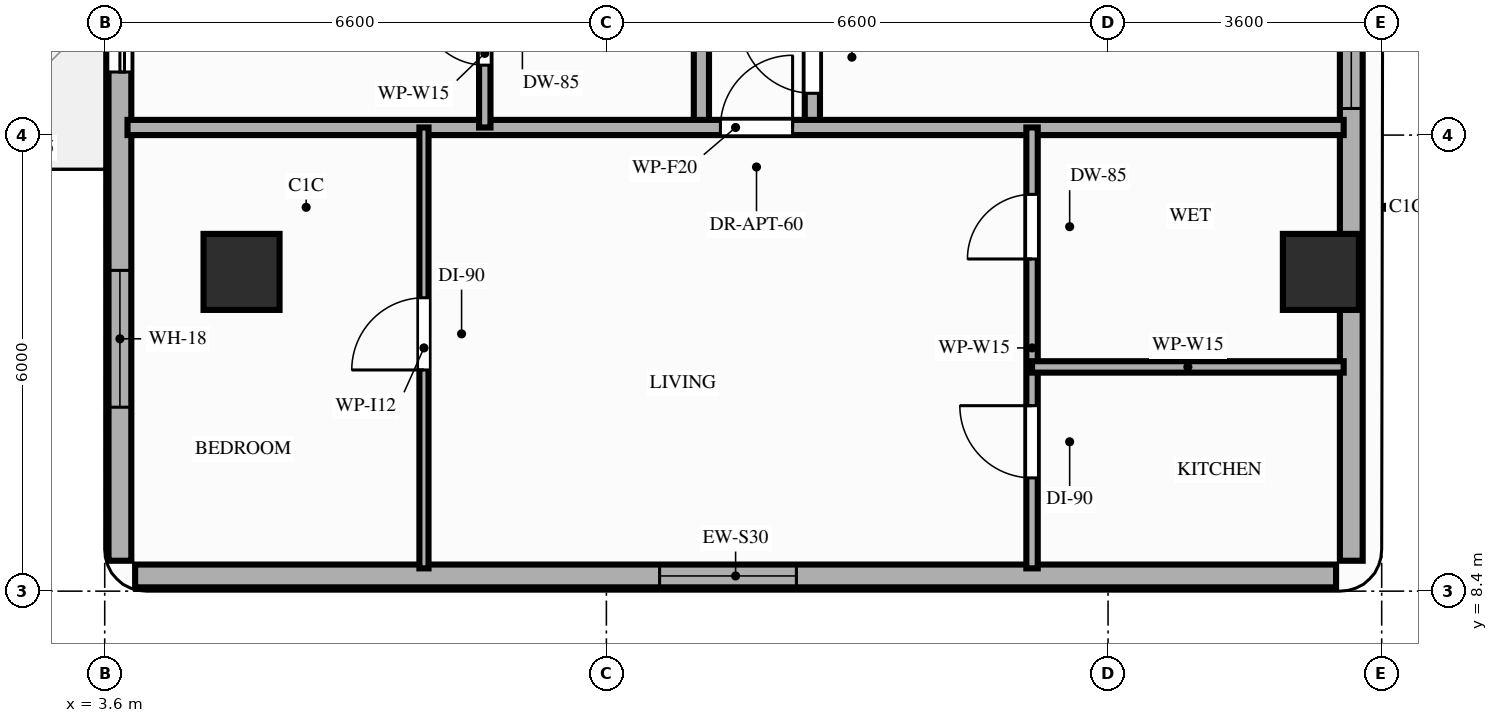
"""IFC4 building model, lengths in metres.
Left out: names, types, materials, properties, quantities, classifications, styles, units other than length and angle.
Written with IfcOpenShell. Run it as: python <this file> out.ifc"""

import sys

from ifc_helpers import new_model, si_unit, direction, frame, frame_2d, origin, origin_2d, place, context, subcontext, project, spatial, rectangle, extrude, element, fill, save


model = new_model("IFC4")
c1 = context("Model", 3, precision=1e-05, world=origin(), true_north=direction((0.0, 1.0)))
c2 = subcontext(c1, "Body", "Model", "MODEL_VIEW")
j1 = project(units=[si_unit("LENGTHUNIT", "METRE"), si_unit("PLANEANGLEUNIT", "RADIAN")], contexts=[c1])
p1 = place(None, origin())
s1 = spatial("IfcSite", under=j1, at=p1, CompositionType="ELEMENT")
p2 = place(p1, origin())
s2 = spatial("IfcBuilding", under=s1, at=p2, CompositionType="ELEMENT")
p3 = place(p2, frame((0.0, 0.0, 107.4)))
s3 = spatial("IfcBuildingStorey", under=s2, at=p3, CompositionType="ELEMENT", Elevation=107.4)
for number, where, z_axis, x_axis in (
    (1, (5.4, 12.6, 0.0), (0.0, 0.0, 1.0), (1.0, 0.0, 0.0)),
    (2, (19.6, 12.6, 0.0), (0.0, 0.0, 1.0), (1.0, 0.0, 0.0)),
):
    element("IfcColumn", number, at=place(p3, frame(where, z_axis=z_axis, x_axis=x_axis)), inside=s3, PredefinedType="COLUMN", context=c2, shape_type="SweptSolid", body=[
        extrude(rectangle(XDim=1.0, YDim=1.0, at=origin_2d()), origin(), (0.0, 0.0, 1.0), 3.2),
    ])
p4 = place(p3, frame((4.0, 8.6, 0.0), z_axis=(0.0, 0.0, 1.0), x_axis=(1.0, 0.0, 0.0)))
e3 = element("IfcWall", 3, at=p4, inside=s3, PredefinedType="STANDARD", context=c2, shape_type="SweptSolid", body=[
    extrude(rectangle(XDim=15.8, YDim=0.3, at=frame_2d((7.9, 0.0))), origin(), (0.0, 0.0, 1.0), 3.02),
])
p5 = place(p4, frame((6.9, 0.0, 0.85)))
e4 = element("IfcOpeningElement", 4, at=p5, cuts=e3, PredefinedType="OPENING", context=c2, shape_type="SweptSolid", body=[
    extrude(rectangle(XDim=1.8, YDim=1.75, at=frame_2d((0.9, 0.875))), frame((0.0, 0.16, 0.0), z_axis=(0.0, -1.0, 0.0), x_axis=(1.0, 0.0, 0.0)), (0.0, 0.0, 1.0), 0.32),
])
p6 = place(p3, frame((3.8, 42.1, 0.0), z_axis=(0.0, 0.0, 1.0), x_axis=(0.0, -1.0, 0.0)))
e5 = element("IfcWall", 5, at=p6, inside=s3, PredefinedType="STANDARD", context=c2, shape_type="SweptSolid", body=[
    extrude(rectangle(XDim=33.3, YDim=0.3, at=frame_2d((16.65, 0.0))), origin(), (0.0, 0.0, 1.0), 2.71),
])
p7 = place(p6, frame((25.47, 0.0, 0.0)))
e6 = element("IfcOpeningElement", 6, at=p7, cuts=e5, PredefinedType="OPENING", context=c2, shape_type="SweptSolid", body=[
    extrude(rectangle(XDim=1.4, YDim=2.1, at=frame_2d((0.7, 1.05))), frame((0.0, 0.16, 0.0), z_axis=(0.0, -1.0, 0.0), x_axis=(1.0, 0.0, 0.0)), (0.0, 0.0, 1.0), 0.32),
])
p8 = place(p6, frame((15.3, 0.0, 0.0)))
e7 = element("IfcOpeningElement", 7, at=p8, cuts=e5, PredefinedType="OPENING", context=c2, shape_type="SweptSolid", body=[
    extrude(rectangle(XDim=1.4, YDim=2.1, at=frame_2d((0.7, 1.05))), frame((0.0, 0.16, 0.0), z_axis=(0.0, -1.0, 0.0), x_axis=(1.0, 0.0, 0.0)), (0.0, 0.0, 1.0), 0.32),
])
p9 = place(p6, frame((29.48, 0.0, 0.85)))
e8 = element("IfcOpeningElement", 8, at=p9, cuts=e5, PredefinedType="OPENING", context=c2, shape_type="SweptSolid", body=[
    extrude(rectangle(XDim=1.8, YDim=1.61, at=frame_2d((0.9, 0.805))), frame((0.0, 0.16, 0.0), z_axis=(0.0, -1.0, 0.0), x_axis=(1.0, 0.0, 0.0)), (0.0, 0.0, 1.0), 0.32),
])
p10 = place(p6, frame((20.5, 0.0, 0.85)))
e9 = element("IfcOpeningElement", 9, at=p10, cuts=e5, PredefinedType="OPENING", context=c2, shape_type="SweptSolid", body=[
    extrude(rectangle(XDim=1.8, YDim=1.61, at=frame_2d((0.9, 0.805))), frame((0.0, 0.16, 0.0), z_axis=(0.0, -1.0, 0.0), x_axis=(1.0, 0.0, 0.0)), (0.0, 0.0, 1.0), 0.32),
])
p11 = place(p6, frame((9.9, 0.0, 0.85)))
e10 = element("IfcOpeningElement", 10, at=p11, cuts=e5, PredefinedType="OPENING", context=c2, shape_type="SweptSolid", body=[
    extrude(rectangle(XDim=1.8, YDim=1.61, at=frame_2d((0.9, 0.805))), frame((0.0, 0.16, 0.0), z_axis=(0.0, -1.0, 0.0), x_axis=(1.0, 0.0, 0.0)), (0.0, 0.0, 1.0), 0.32),
])
p12 = place(p6, frame((3.8, 0.0, 0.85)))
e11 = element("IfcOpeningElement", 11, at=p12, cuts=e5, PredefinedType="OPENING", context=c2, shape_type="SweptSolid", body=[
    extrude(rectangle(XDim=1.8, YDim=1.61, at=frame_2d((0.9, 0.805))), frame((0.0, 0.16, 0.0), z_axis=(0.0, -1.0, 0.0), x_axis=(1.0, 0.0, 0.0)), (0.0, 0.0, 1.0), 0.32),
])
p13 = place(p3, frame((20.0, 8.8, 0.0), z_axis=(0.0, 0.0, 1.0), x_axis=(0.0, 1.0, 0.0)))
e12 = element("IfcWall", 12, at=p13, inside=s3, PredefinedType="STANDARD", context=c2, shape_type="SweptSolid", body=[
    extrude(rectangle(XDim=17.55, YDim=0.3, at=frame_2d((8.775, 0.0))), origin(), (0.0, 0.0, 1.0), 2.41),
])
p14 = place(p13, frame((11.2, 0.0, 0.85)))
e13 = element("IfcOpeningElement", 13, at=p14, cuts=e12, PredefinedType="OPENING", context=c2, shape_type="SweptSolid", body=[
    extrude(rectangle(XDim=1.8, YDim=1.31, at=frame_2d((0.9, 0.655))), frame((0.0, 0.16, 0.0), z_axis=(0.0, -1.0, 0.0), x_axis=(1.0, 0.0, 0.0)), (0.0, 0.0, 1.0), 0.32),
])
p15 = place(p13, frame((5.95, 0.0, 0.85)))
e14 = element("IfcOpeningElement", 14, at=p15, cuts=e12, PredefinedType="OPENING", context=c2, shape_type="SweptSolid", body=[
    extrude(rectangle(XDim=1.8, YDim=1.31, at=frame_2d((0.9, 0.655))), frame((0.0, 0.16, 0.0), z_axis=(0.0, -1.0, 0.0), x_axis=(1.0, 0.0, 0.0)), (0.0, 0.0, 1.0), 0.32),
])
p16 = place(p3, frame((11.45, 14.5, 0.0), z_axis=(0.0, 0.0, 1.0), x_axis=(0.0, 1.0, 0.0)))
e15 = element("IfcWall", 15, at=p16, inside=s3, PredefinedType="PARTITIONING", context=c2, shape_type="SweptSolid", body=[
    extrude(rectangle(XDim=13.6, YDim=0.2, at=frame_2d((6.8, 0.0))), origin(), (0.0, 0.0, 1.0), 2.41),
])
p17 = place(p16, frame((2.33, 0.0, 0.0)))
e16 = element("IfcOpeningElement", 16, at=p17, cuts=e15, PredefinedType="OPENING", context=c2, shape_type="SweptSolid", body=[
    extrude(rectangle(XDim=0.95, YDim=2.15, at=frame_2d((0.475, 1.075))), frame((0.0, 0.11, 0.0), z_axis=(0.0, -1.0, 0.0), x_axis=(1.0, 0.0, 0.0)), (0.0, 0.0, 1.0), 0.22),
])
p18 = place(p16, frame((5.5, 0.0, 0.0)))
e17 = element("IfcOpeningElement", 17, at=p18, cuts=e15, PredefinedType="OPENING", context=c2, shape_type="SweptSolid", body=[
    extrude(rectangle(XDim=0.95, YDim=2.15, at=frame_2d((0.475, 1.075))), frame((0.0, 0.11, 0.0), z_axis=(0.0, -1.0, 0.0), x_axis=(1.0, 0.0, 0.0)), (0.0, 0.0, 1.0), 0.22),
])
p19 = place(p16, frame((10.47, 0.0, 0.0)))
e18 = element("IfcOpeningElement", 18, at=p19, cuts=e15, PredefinedType="OPENING", context=c2, shape_type="SweptSolid", body=[
    extrude(rectangle(XDim=0.95, YDim=2.15, at=frame_2d((0.475, 1.075))), frame((0.0, 0.11, 0.0), z_axis=(0.0, -1.0, 0.0), x_axis=(1.0, 0.0, 0.0)), (0.0, 0.0, 1.0), 0.22),
])
p20 = place(p3, frame((12.91, 14.5, 0.0), z_axis=(0.0, 0.0, 1.0), x_axis=(0.0, 1.0, 0.0)))
e19 = element("IfcWall", 19, at=p20, inside=s3, PredefinedType="PARTITIONING", context=c2, shape_type="SweptSolid", body=[
    extrude(rectangle(XDim=13.6, YDim=0.2, at=frame_2d((6.8, 0.0))), origin(), (0.0, 0.0, 1.0), 2.41),
])
p21 = place(p20, frame((0.45, 0.0, 0.0)))
e20 = element("IfcOpeningElement", 20, at=p21, cuts=e19, PredefinedType="OPENING", context=c2, shape_type="SweptSolid", body=[
    extrude(rectangle(XDim=0.95, YDim=2.15, at=frame_2d((0.475, 1.075))), frame((0.0, 0.11, 0.0), z_axis=(0.0, -1.0, 0.0), x_axis=(1.0, 0.0, 0.0)), (0.0, 0.0, 1.0), 0.22),
])
p22 = place(p20, frame((2.75, 0.0, 0.0)))
e21 = element("IfcOpeningElement", 21, at=p22, cuts=e19, PredefinedType="OPENING", context=c2, shape_type="SweptSolid", body=[
    extrude(rectangle(XDim=0.95, YDim=2.1, at=frame_2d((0.475, 1.05))), frame((0.0, 0.11, 0.0), z_axis=(0.0, -1.0, 0.0), x_axis=(1.0, 0.0, 0.0)), (0.0, 0.0, 1.0), 0.22),
])
p23 = place(p20, frame((10.91, 0.0, 0.0)))
e22 = element("IfcOpeningElement", 22, at=p23, cuts=e19, PredefinedType="OPENING", context=c2, shape_type="SweptSolid", body=[
    extrude(rectangle(XDim=0.95, YDim=2.15, at=frame_2d((0.475, 1.075))), frame((0.0, 0.11, 0.0), z_axis=(0.0, -1.0, 0.0), x_axis=(1.0, 0.0, 0.0)), (0.0, 0.0, 1.0), 0.22),
])
p24 = place(p20, frame((7.27, 0.0, 0.0)))
e23 = element("IfcOpeningElement", 23, at=p24, cuts=e19, PredefinedType="OPENING", context=c2, shape_type="SweptSolid", body=[
    extrude(rectangle(XDim=0.95, YDim=2.15, at=frame_2d((0.475, 1.075))), frame((0.0, 0.11, 0.0), z_axis=(0.0, -1.0, 0.0), x_axis=(1.0, 0.0, 0.0)), (0.0, 0.0, 1.0), 0.22),
])
p25 = place(p3, frame((3.9, 14.5, 0.0), z_axis=(0.0, 0.0, 1.0), x_axis=(1.0, 0.0, 0.0)))
e24 = element("IfcWall", 24, at=p25, inside=s3, PredefinedType="PARTITIONING", context=c2, shape_type="SweptSolid", body=[
    extrude(rectangle(XDim=16.0, YDim=0.2, at=frame_2d((8.0, 0.0))), origin(), (0.0, 0.0, 1.0), 2.41),
])
p26 = place(p25, frame((7.8, 0.0, 0.0)))
e25 = element("IfcOpeningElement", 25, at=p26, cuts=e24, PredefinedType="OPENING", context=c2, shape_type="SweptSolid", body=[
    extrude(rectangle(XDim=0.95, YDim=2.15, at=frame_2d((0.475, 1.075))), frame((0.0, 0.11, 0.0), z_axis=(0.0, -1.0, 0.0), x_axis=(1.0, 0.0, 0.0)), (0.0, 0.0, 1.0), 0.22),
])
p27 = place(p3, frame((8.6, 14.5, 0.0), z_axis=(0.0, 0.0, 1.0), x_axis=(0.0, 1.0, 0.0)))
e26 = element("IfcWall", 26, at=p27, inside=s3, PredefinedType="PARTITIONING", context=c2, shape_type="SweptSolid", body=[
    extrude(rectangle(XDim=1.95, YDim=0.15, at=frame_2d((0.975, 0.0))), origin(), (0.0, 0.0, 1.0), 2.6),
])
p28 = place(p27, frame((0.82, 0.0, 0.0)))
e27 = element("IfcOpeningElement", 27, at=p28, cuts=e26, PredefinedType="OPENING", context=c2, shape_type="SweptSolid", body=[
    extrude(rectangle(XDim=0.85, YDim=2.1, at=frame_2d((0.425, 1.05))), frame((0.0, 0.085, 0.0), z_axis=(0.0, -1.0, 0.0), x_axis=(1.0, 0.0, 0.0)), (0.0, 0.0, 1.0), 0.17),
])
p29 = place(p3, frame((7.8, 8.7, 0.0), z_axis=(0.0, 0.0, 1.0), x_axis=(0.0, 1.0, 0.0)))
e28 = element("IfcWall", 28, at=p29, inside=s3, PredefinedType="PARTITIONING", context=c2, shape_type="SweptSolid", body=[
    extrude(rectangle(XDim=5.8, YDim=0.12, at=frame_2d((2.9, 0.0))), origin(), (0.0, 0.0, 1.0), 2.41),
])
p30 = place(p29, frame((2.61, 0.0, 0.0)))
e29 = element("IfcOpeningElement", 29, at=p30, cuts=e28, PredefinedType="OPENING", context=c2, shape_type="SweptSolid", body=[
    extrude(rectangle(XDim=0.95, YDim=2.15, at=frame_2d((0.475, 1.075))), frame((0.0, 0.07, 0.0), z_axis=(0.0, -1.0, 0.0), x_axis=(1.0, 0.0, 0.0)), (0.0, 0.0, 1.0), 0.14),
])
p31 = place(p3, frame((15.8, 8.7, 0.0), z_axis=(0.0, 0.0, 1.0), x_axis=(0.0, 1.0, 0.0)))
e30 = element("IfcWall", 30, at=p31, inside=s3, PredefinedType="PARTITIONING", context=c2, shape_type="SweptSolid", body=[
    extrude(rectangle(XDim=5.8, YDim=0.15, at=frame_2d((2.9, 0.0))), origin(), (0.0, 0.0, 1.0), 2.41),
])
p32 = place(p31, frame((1.19, 0.0, 0.0)))
e31 = element("IfcOpeningElement", 31, at=p32, cuts=e30, PredefinedType="OPENING", context=c2, shape_type="SweptSolid", body=[
    extrude(rectangle(XDim=0.95, YDim=2.15, at=frame_2d((0.475, 1.075))), frame((0.0, 0.085, 0.0), z_axis=(0.0, -1.0, 0.0), x_axis=(1.0, 0.0, 0.0)), (0.0, 0.0, 1.0), 0.17),
])
p33 = place(p31, frame((4.07, 0.0, 0.0)))
e32 = element("IfcOpeningElement", 32, at=p33, cuts=e30, PredefinedType="OPENING", context=c2, shape_type="SweptSolid", body=[
    extrude(rectangle(XDim=0.85, YDim=2.1, at=frame_2d((0.425, 1.05))), frame((0.0, 0.085, 0.0), z_axis=(0.0, -1.0, 0.0), x_axis=(1.0, 0.0, 0.0)), (0.0, 0.0, 1.0), 0.17),
])
p34 = place(p3, frame((15.8, 11.35, 0.0), z_axis=(0.0, 0.0, 1.0), x_axis=(1.0, 0.0, 0.0)))
e33 = element("IfcWall", 33, at=p34, inside=s3, PredefinedType="PARTITIONING", context=c2, shape_type="SweptSolid", body=[
    extrude(rectangle(XDim=4.1, YDim=0.15, at=frame_2d((2.05, 0.0))), origin(), (0.0, 0.0, 1.0), 3.02),
])
p35 = place(p7, origin())
e34 = element("IfcDoor", 34, at=p35, inside=s3, OperationType="SLIDING_TO_RIGHT", PredefinedType="DOOR", context=c2, shape_type="SweptSolid", body=[
    extrude(rectangle(XDim=1.4, YDim=2.1, at=frame_2d((0.7, 1.05))), frame((0.0, 0.025, 0.0), z_axis=(0.0, -1.0, 0.0), x_axis=(1.0, 0.0, 0.0)), (0.0, 0.0, 1.0), 0.05),
])
fill(e6, e34)
p36 = place(p9, origin())
e35 = element("IfcWindow", 35, at=p36, inside=s3, PartitioningType="SINGLE_PANEL", PredefinedType="WINDOW", context=c2, shape_type="SweptSolid", body=[
    extrude(rectangle(XDim=1.8, YDim=1.61, at=frame_2d((0.9, 0.805))), frame((0.0, 0.03, 0.0), z_axis=(0.0, -1.0, 0.0), x_axis=(1.0, 0.0, 0.0)), (0.0, 0.0, 1.0), 0.06),
])
fill(e8, e35)
p37 = place(p5, origin())
e36 = element("IfcWindow", 36, at=p37, inside=s3, PartitioningType="SINGLE_PANEL", PredefinedType="WINDOW", context=c2, shape_type="SweptSolid", body=[
    extrude(rectangle(XDim=1.8, YDim=1.75, at=frame_2d((0.9, 0.875))), frame((0.0, 0.03, 0.0), z_axis=(0.0, -1.0, 0.0), x_axis=(1.0, 0.0, 0.0)), (0.0, 0.0, 1.0), 0.06),
])
fill(e4, e36)
p38 = place(p15, origin())
e37 = element("IfcWindow", 37, at=p38, inside=s3, PartitioningType="SINGLE_PANEL", PredefinedType="WINDOW", context=c2, shape_type="SweptSolid", body=[
    extrude(rectangle(XDim=1.8, YDim=1.31, at=frame_2d((0.9, 0.655))), frame((0.0, 0.03, 0.0), z_axis=(0.0, -1.0, 0.0), x_axis=(1.0, 0.0, 0.0)), (0.0, 0.0, 1.0), 0.06),
])
fill(e14, e37)
p39 = place(p28, origin())
e38 = element("IfcDoor", 38, at=p39, inside=s3, OperationType="SINGLE_SWING_RIGHT", PredefinedType="DOOR", context=c2, shape_type="SweptSolid", body=[
    extrude(rectangle(XDim=0.85, YDim=2.1, at=frame_2d((0.425, 1.05))), frame((0.0, 0.025, 0.0), z_axis=(0.0, -1.0, 0.0), x_axis=(1.0, 0.0, 0.0)), (0.0, 0.0, 1.0), 0.05),
])
fill(e27, e38)
p40 = place(p26, origin())
e39 = element("IfcDoor", 39, at=p40, inside=s3, OperationType="SINGLE_SWING_RIGHT", PredefinedType="DOOR", context=c2, shape_type="SweptSolid", body=[
    extrude(rectangle(XDim=0.95, YDim=2.15, at=frame_2d((0.475, 1.075))), frame((0.0, 0.025, 0.0), z_axis=(0.0, -1.0, 0.0), x_axis=(1.0, 0.0, 0.0)), (0.0, 0.0, 1.0), 0.05),
])
fill(e25, e39)
p41 = place(p30, origin())
e40 = element("IfcDoor", 40, at=p41, inside=s3, OperationType="SINGLE_SWING_LEFT", PredefinedType="DOOR", context=c2, shape_type="SweptSolid", body=[
    extrude(rectangle(XDim=0.95, YDim=2.15, at=frame_2d((0.475, 1.075))), frame((0.0, 0.025, 0.0), z_axis=(0.0, -1.0, 0.0), x_axis=(1.0, 0.0, 0.0)), (0.0, 0.0, 1.0), 0.05),
])
fill(e29, e40)
p42 = place(p32, origin())
e41 = element("IfcDoor", 41, at=p42, inside=s3, OperationType="SINGLE_SWING_RIGHT", PredefinedType="DOOR", context=c2, shape_type="SweptSolid", body=[
    extrude(rectangle(XDim=0.95, YDim=2.15, at=frame_2d((0.475, 1.075))), frame((0.0, 0.025, 0.0), z_axis=(0.0, -1.0, 0.0), x_axis=(1.0, 0.0, 0.0)), (0.0, 0.0, 1.0), 0.05),
])
fill(e31, e41)
p43 = place(p33, origin())
e42 = element("IfcDoor", 42, at=p43, inside=s3, OperationType="SINGLE_SWING_LEFT", PredefinedType="DOOR", context=c2, shape_type="SweptSolid", body=[
    extrude(rectangle(XDim=0.85, YDim=2.1, at=frame_2d((0.425, 1.05))), frame((0.0, 0.025, 0.0), z_axis=(0.0, -1.0, 0.0), x_axis=(1.0, 0.0, 0.0)), (0.0, 0.0, 1.0), 0.05),
])
fill(e32, e42)
p44 = place(p21, origin())
e43 = element("IfcDoor", 43, at=p44, inside=s3, OperationType="SINGLE_SWING_RIGHT", PredefinedType="DOOR", context=c2, shape_type="SweptSolid", body=[
    extrude(rectangle(XDim=0.95, YDim=2.15, at=frame_2d((0.475, 1.075))), frame((0.0, 0.025, 0.0), z_axis=(0.0, -1.0, 0.0), x_axis=(1.0, 0.0, 0.0)), (0.0, 0.0, 1.0), 0.05),
])
fill(e20, e43)
save(model, sys.argv[1])
